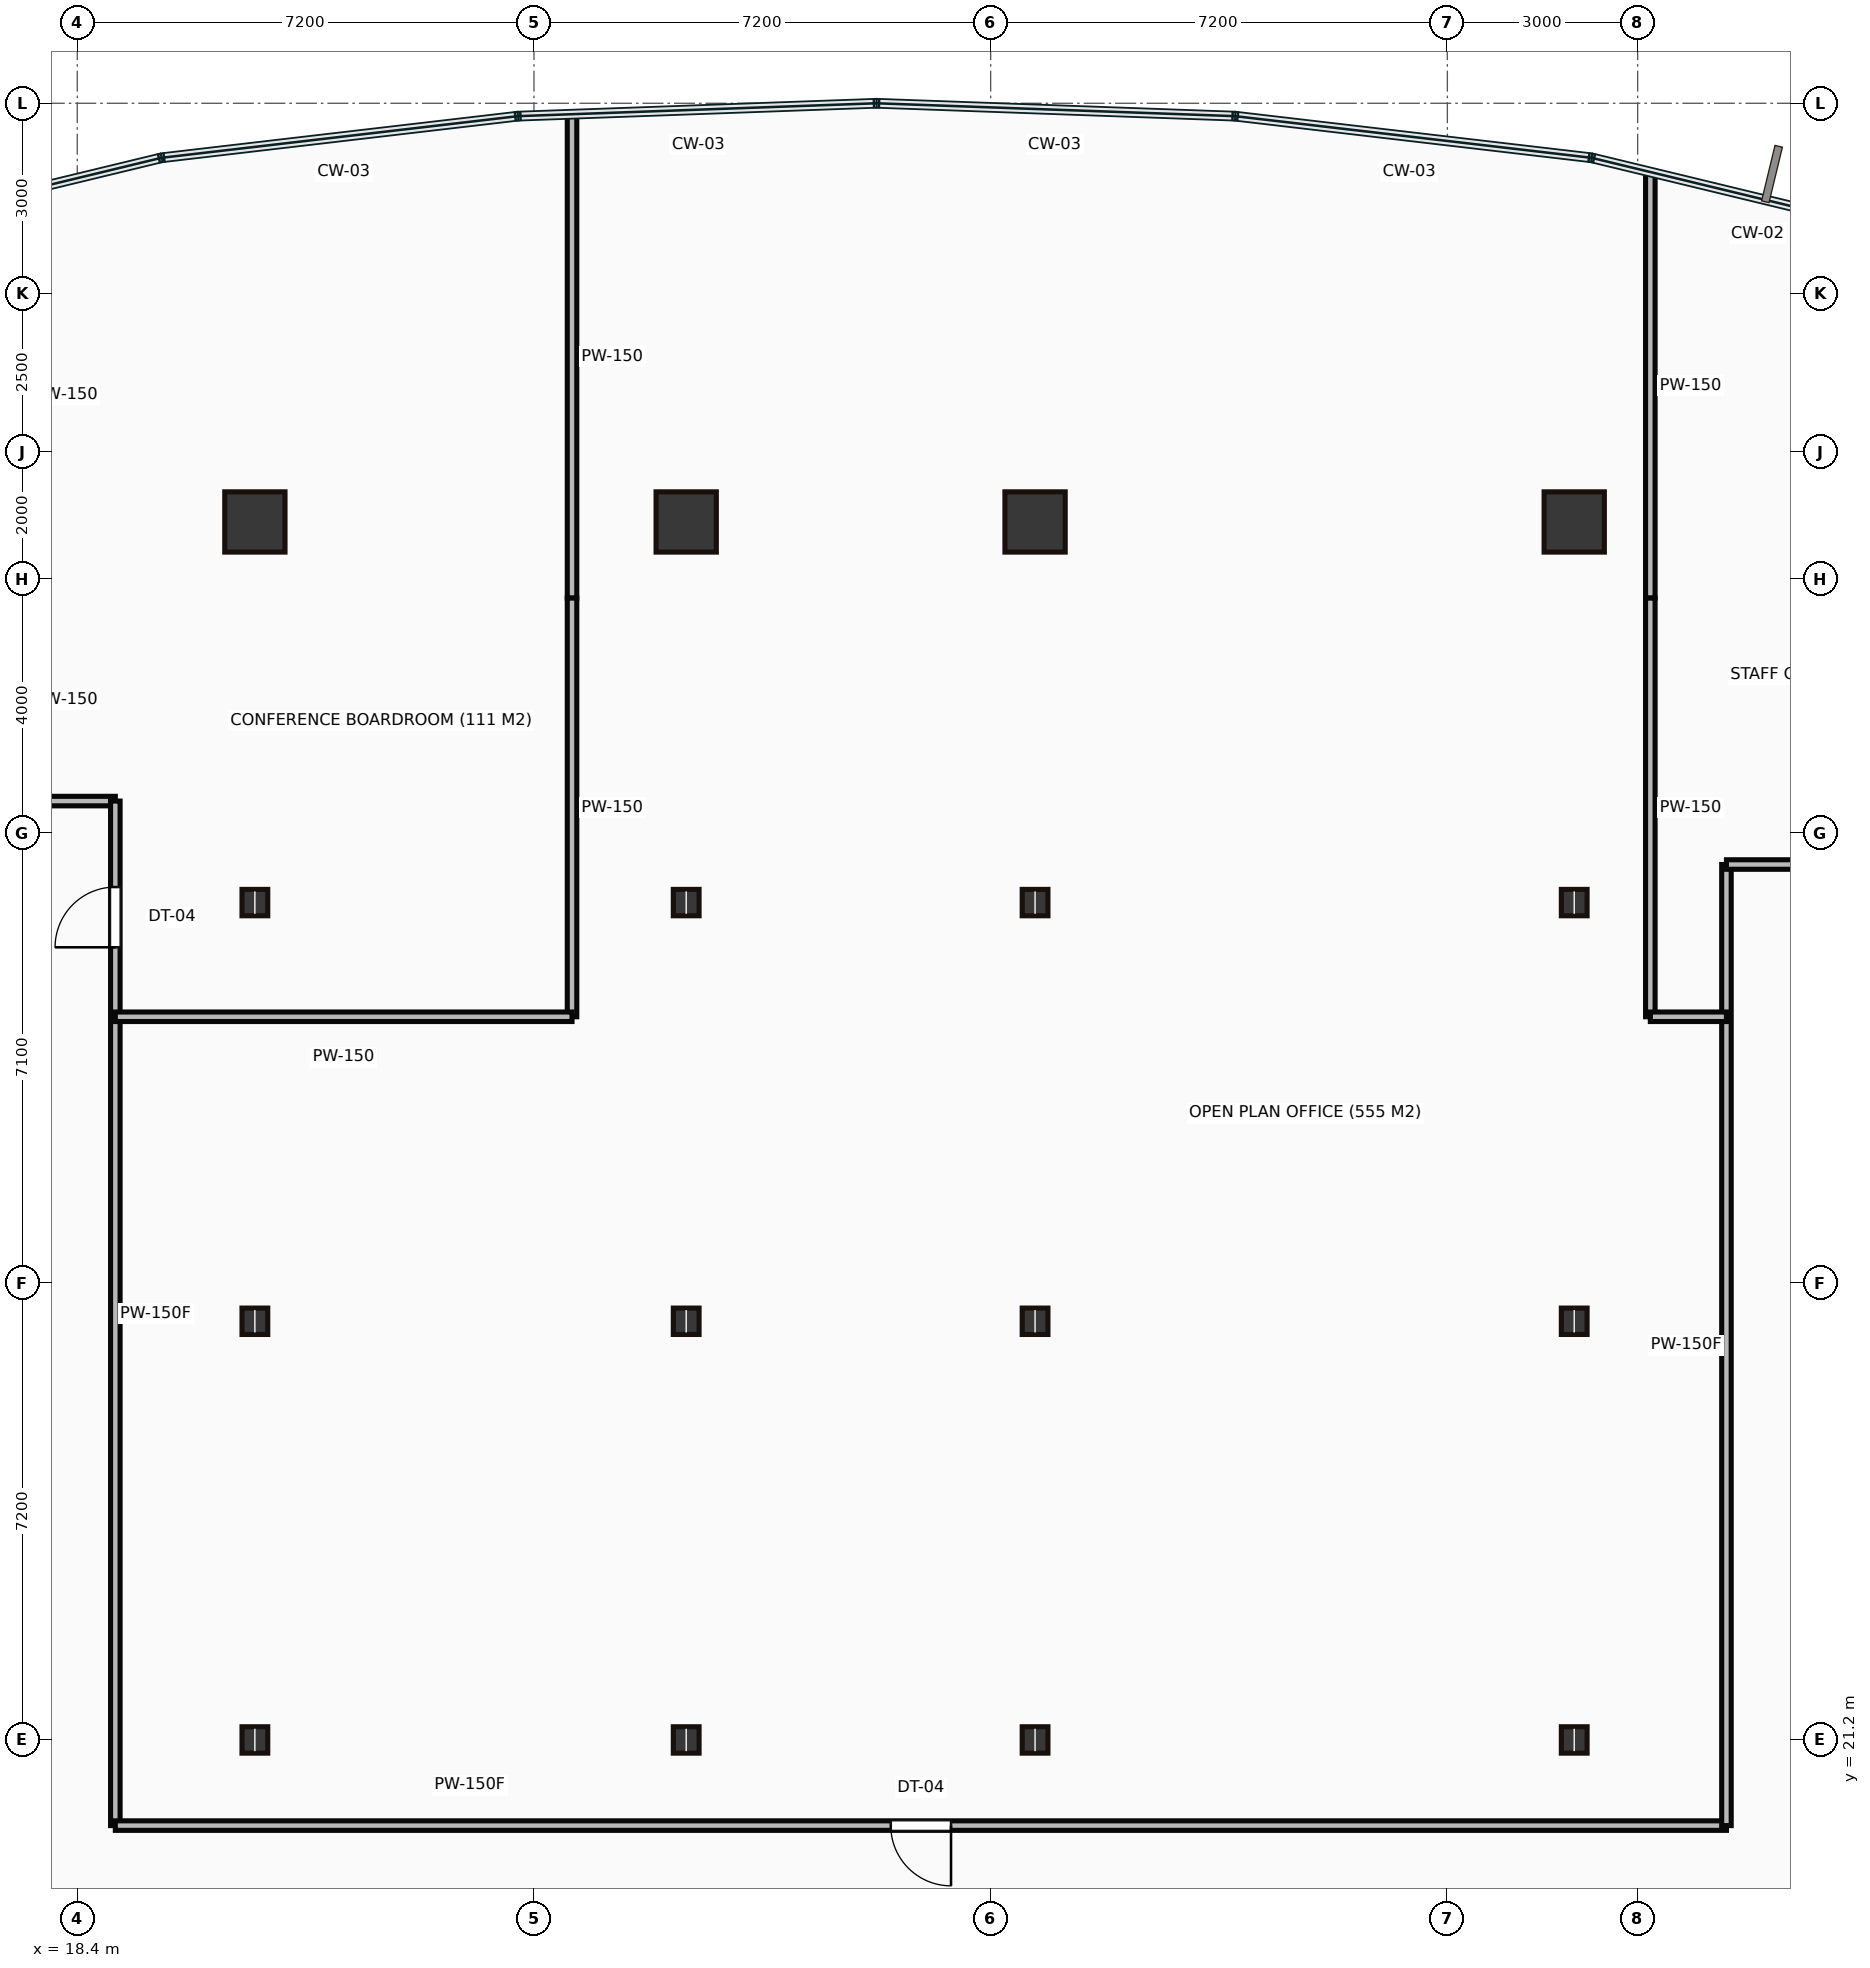
"""IFC4 building model, lengths in metres.
Left out: names, types, materials, properties, quantities, classifications, styles, units other than length and angle.
Written with IfcOpenShell. Run it as: python <this file> out.ifc"""

import sys

from ifc_helpers import new_model, si_unit, direction, frame, frame_2d, origin, origin_2d, place, context, subcontext, project, spatial, rectangle, hollow_rectangle, i_section, extrude, source, transform, mapped, element, fill, save


model = new_model("IFC4")
c1 = context("Model", 3, precision=1e-05, world=origin(), true_north=direction((0.0, 1.0)))
c2 = subcontext(c1, "Body", "Model", "MODEL_VIEW")
j1 = project(units=[si_unit("LENGTHUNIT", "METRE"), si_unit("PLANEANGLEUNIT", "RADIAN")], contexts=[c1])
p1 = place(None, origin())
s1 = spatial("IfcSite", under=j1, at=p1, CompositionType="ELEMENT")
p2 = place(p1, origin())
s2 = spatial("IfcBuilding", under=s1, at=p2, CompositionType="ELEMENT")
p3 = place(p2, frame((0.0, 0.0, 58.05)))
s3 = spatial("IfcBuildingStorey", under=s2, at=p3, CompositionType="ELEMENT", Elevation=58.05)
m1 = source(origin(), c2, "Body", "SweptSolid", [
    extrude(i_section(OverallWidth=0.406, OverallDepth=0.416, WebThickness=0.03, FlangeThickness=0.048, at=origin_2d()), origin(), (0.0, 0.0, 1.0), 3.65),
])
for number, where, z_axis, x_axis in (
    (1, (21.2, 21.2, 0.0), (0.0, 0.0, 1.0), (1.0, 0.0, 0.0)),
    (2, (21.2, 27.8, 0.0), (0.0, 0.0, 1.0), (1.0, 0.0, 0.0)),
    (3, (21.2, 34.4, 0.0), (0.0, 0.0, 1.0), (1.0, 0.0, 0.0)),
):
    element("IfcColumn", number, at=place(p3, frame(where, z_axis=z_axis, x_axis=x_axis)), inside=s3, PredefinedType="COLUMN", context=c2, shape_type="MappedRepresentation", body=[
        mapped(m1, transform((0.0, 0.0, 0.0))),
    ])
m2 = source(origin(), c2, "Body", "SweptSolid", [
    extrude(hollow_rectangle(XDim=0.95, YDim=0.95, WallThickness=0.045, at=origin_2d()), origin(), (0.0, 0.0, 1.0), 3.65),
])
p4 = place(p3, frame((21.2, 40.4, 0.0), z_axis=(0.0, 0.0, 1.0), x_axis=(1.0, 0.0, 0.0)))
e4 = element("IfcColumn", 4, at=p4, inside=s3, PredefinedType="COLUMN", context=c2, shape_type="MappedRepresentation", body=[
    mapped(m2, transform((0.0, 0.0, 0.0))),
])
for number, where, z_axis, x_axis in (
    (5, (28.0, 21.2, 0.0), (0.0, 0.0, 1.0), (1.0, 0.0, 0.0)),
    (6, (28.0, 27.8, 0.0), (0.0, 0.0, 1.0), (1.0, 0.0, 0.0)),
    (7, (28.0, 34.4, 0.0), (0.0, 0.0, 1.0), (1.0, 0.0, 0.0)),
):
    element("IfcColumn", number, at=place(p3, frame(where, z_axis=z_axis, x_axis=x_axis)), inside=s3, PredefinedType="COLUMN", context=c2, shape_type="MappedRepresentation", body=[
        mapped(m1, transform((0.0, 0.0, 0.0))),
    ])
p5 = place(p3, frame((28.0, 40.4, 0.0), z_axis=(0.0, 0.0, 1.0), x_axis=(1.0, 0.0, 0.0)))
e8 = element("IfcColumn", 8, at=p5, inside=s3, PredefinedType="COLUMN", context=c2, shape_type="MappedRepresentation", body=[
    mapped(m2, transform((0.0, 0.0, 0.0))),
])
for number, where, z_axis, x_axis in (
    (9, (33.5, 21.2, 0.0), (0.0, 0.0, 1.0), (1.0, 0.0, 0.0)),
    (10, (33.5, 27.8, 0.0), (0.0, 0.0, 1.0), (1.0, 0.0, 0.0)),
    (11, (33.5, 34.4, 0.0), (0.0, 0.0, 1.0), (1.0, 0.0, 0.0)),
):
    element("IfcColumn", number, at=place(p3, frame(where, z_axis=z_axis, x_axis=x_axis)), inside=s3, PredefinedType="COLUMN", context=c2, shape_type="MappedRepresentation", body=[
        mapped(m1, transform((0.0, 0.0, 0.0))),
    ])
p6 = place(p3, frame((33.5, 40.4, 0.0), z_axis=(0.0, 0.0, 1.0), x_axis=(1.0, 0.0, 0.0)))
e12 = element("IfcColumn", 12, at=p6, inside=s3, PredefinedType="COLUMN", context=c2, shape_type="MappedRepresentation", body=[
    mapped(m2, transform((0.0, 0.0, 0.0))),
])
for number, where, z_axis, x_axis in (
    (13, (42.0, 21.2, 0.0), (0.0, 0.0, 1.0), (1.0, 0.0, 0.0)),
    (14, (42.0, 27.8, 0.0), (0.0, 0.0, 1.0), (1.0, 0.0, 0.0)),
    (15, (42.0, 34.4, 0.0), (0.0, 0.0, 1.0), (1.0, 0.0, 0.0)),
):
    element("IfcColumn", number, at=place(p3, frame(where, z_axis=z_axis, x_axis=x_axis)), inside=s3, PredefinedType="COLUMN", context=c2, shape_type="MappedRepresentation", body=[
        mapped(m1, transform((0.0, 0.0, 0.0))),
    ])
p7 = place(p3, frame((42.0, 40.4, 0.0), z_axis=(0.0, 0.0, 1.0), x_axis=(1.0, 0.0, 0.0)))
e16 = element("IfcColumn", 16, at=p7, inside=s3, PredefinedType="COLUMN", context=c2, shape_type="MappedRepresentation", body=[
    mapped(m2, transform((0.0, 0.0, 0.0))),
])
m3 = source(origin(), c2, "Body", "SweptSolid", [
    extrude(rectangle(XDim=2.2, YDim=0.15, at=frame_2d((1.1, 0.0))), origin(), (0.0, 0.0, 1.0), 3.4),
])
p8 = place(p3, frame((16.8, 36.0, 0.0), z_axis=(0.0, 0.0, 1.0), x_axis=(1.0, 0.0, 0.0)))
e17 = element("IfcWall", 17, at=p8, inside=s3, PredefinedType="PARTITIONING", context=c2, shape_type="MappedRepresentation", body=[
    mapped(m3, transform((0.0, 0.0, 0.0))),
])
m4 = source(origin(), c2, "Body", "SweptSolid", [
    extrude(rectangle(XDim=16.15, YDim=0.15, at=frame_2d((8.075, 0.0))), origin(), (0.0, 0.0, 1.0), 3.4),
])
p9 = place(p3, frame((19.0, 36.0, 0.0), z_axis=(0.0, 0.0, 1.0), x_axis=(0.0, -1.0, 0.0)))
e18 = element("IfcWall", 18, at=p9, inside=s3, PredefinedType="PARTITIONING", context=c2, shape_type="MappedRepresentation", body=[
    mapped(m4, transform((0.0, 0.0, 0.0))),
])
p10 = place(p9, frame((1.355, 0.0, 0.0)))
e19 = element("IfcOpeningElement", 19, at=p10, cuts=e18, PredefinedType="OPENING", context=c2, shape_type="SweptSolid", body=[
    extrude(rectangle(XDim=0.95, YDim=2.15, at=frame_2d((0.475, 1.075))), frame((0.0, 0.085, 0.0), z_axis=(0.0, -1.0, 0.0), x_axis=(1.0, 0.0, 0.0)), (0.0, 0.0, 1.0), 0.17),
])
m5 = source(origin(), c2, "Body", "SweptSolid", [
    extrude(rectangle(XDim=25.4, YDim=0.15, at=frame_2d((12.7, 0.0))), origin(), (0.0, 0.0, 1.0), 3.4),
])
p11 = place(p3, frame((19.0, 19.85, 0.0), z_axis=(0.0, 0.0, 1.0), x_axis=(1.0, 0.0, 0.0)))
e20 = element("IfcWall", 20, at=p11, inside=s3, PredefinedType="PARTITIONING", context=c2, shape_type="MappedRepresentation", body=[
    mapped(m5, transform((0.0, 0.0, 0.0))),
])
p12 = place(p11, frame((12.225, 0.0, 0.0)))
e21 = element("IfcOpeningElement", 21, at=p12, cuts=e20, PredefinedType="OPENING", context=c2, shape_type="SweptSolid", body=[
    extrude(rectangle(XDim=0.95, YDim=2.15, at=frame_2d((0.475, 1.075))), frame((0.0, 0.085, 0.0), z_axis=(0.0, -1.0, 0.0), x_axis=(1.0, 0.0, 0.0)), (0.0, 0.0, 1.0), 0.17),
])
m6 = source(origin(), c2, "Body", "SweptSolid", [
    extrude(rectangle(XDim=15.15, YDim=0.15, at=frame_2d((7.575, 0.0))), origin(), (0.0, 0.0, 1.0), 3.4),
])
p13 = place(p3, frame((44.4, 19.85, 0.0), z_axis=(0.0, 0.0, 1.0), x_axis=(0.0, 1.0, 0.0)))
e22 = element("IfcWall", 22, at=p13, inside=s3, PredefinedType="PARTITIONING", context=c2, shape_type="MappedRepresentation", body=[
    mapped(m6, transform((0.0, 0.0, 0.0))),
])
m7 = source(origin(), c2, "Body", "SweptSolid", [
    extrude(rectangle(XDim=2.2, YDim=0.15, at=frame_2d((1.1, 0.0))), origin(), (0.0, 0.0, 1.0), 3.4),
])
p14 = place(p3, frame((44.4, 35.0, 0.0), z_axis=(0.0, 0.0, 1.0), x_axis=(1.0, 0.0, 0.0)))
e23 = element("IfcWall", 23, at=p14, inside=s3, PredefinedType="PARTITIONING", context=c2, shape_type="MappedRepresentation", body=[
    mapped(m7, transform((0.0, 0.0, 0.0))),
])
m8 = source(origin(), c2, "Body", "SweptSolid", [
    extrude(rectangle(XDim=7.608, YDim=0.15, at=frame_2d((3.804, 0.0))), origin(), (0.0, 0.0, 1.0), 3.4),
])
p15 = place(p3, frame((26.2, 46.808, 0.0), z_axis=(0.0, 0.0, 1.0), x_axis=(0.0, -1.0, 0.0)))
e24 = element("IfcWall", 24, at=p15, inside=s3, PredefinedType="PARTITIONING", context=c2, shape_type="MappedRepresentation", body=[
    mapped(m8, transform((0.0, 0.0, 0.0))),
])
m9 = source(origin(), c2, "Body", "SweptSolid", [
    extrude(rectangle(XDim=6.6, YDim=0.15, at=frame_2d((3.3, 0.0))), origin(), (0.0, 0.0, 1.0), 3.4),
])
p16 = place(p3, frame((26.2, 39.2, 0.0), z_axis=(0.0, 0.0, 1.0), x_axis=(0.0, -1.0, 0.0)))
e25 = element("IfcWall", 25, at=p16, inside=s3, PredefinedType="PARTITIONING", context=c2, shape_type="MappedRepresentation", body=[
    mapped(m9, transform((0.0, 0.0, 0.0))),
])
m10 = source(origin(), c2, "Body", "SweptSolid", [
    extrude(rectangle(XDim=7.2, YDim=0.15, at=frame_2d((3.6, 0.0))), origin(), (0.0, 0.0, 1.0), 3.4),
])
p17 = place(p3, frame((26.2, 32.6, 0.0), z_axis=(0.0, 0.0, 1.0), x_axis=(-1.0, 0.0, 0.0)))
e26 = element("IfcWall", 26, at=p17, inside=s3, PredefinedType="PARTITIONING", context=c2, shape_type="MappedRepresentation", body=[
    mapped(m10, transform((0.0, 0.0, 0.0))),
])
m11 = source(origin(), c2, "Body", "SweptSolid", [
    extrude(rectangle(XDim=6.696, YDim=0.15, at=frame_2d((3.348, 0.0))), origin(), (0.0, 0.0, 1.0), 3.4),
])
p18 = place(p3, frame((43.2, 45.896, 0.0), z_axis=(0.0, 0.0, 1.0), x_axis=(0.0, -1.0, 0.0)))
e27 = element("IfcWall", 27, at=p18, inside=s3, PredefinedType="PARTITIONING", context=c2, shape_type="MappedRepresentation", body=[
    mapped(m11, transform((0.0, 0.0, 0.0))),
])
p19 = place(p3, frame((43.2, 39.2, 0.0), z_axis=(0.0, 0.0, 1.0), x_axis=(0.0, -1.0, 0.0)))
e28 = element("IfcWall", 28, at=p19, inside=s3, PredefinedType="PARTITIONING", context=c2, shape_type="MappedRepresentation", body=[
    mapped(m9, transform((0.0, 0.0, 0.0))),
])
m12 = source(origin(), c2, "Body", "SweptSolid", [
    extrude(rectangle(XDim=1.2, YDim=0.15, at=frame_2d((0.6, 0.0))), origin(), (0.0, 0.0, 1.0), 3.4),
])
p20 = place(p3, frame((43.2, 32.6, 0.0), z_axis=(0.0, 0.0, 1.0), x_axis=(1.0, 0.0, 0.0)))
e29 = element("IfcWall", 29, at=p20, inside=s3, PredefinedType="PARTITIONING", context=c2, shape_type="MappedRepresentation", body=[
    mapped(m12, transform((0.0, 0.0, 0.0))),
])
m13 = source(origin(), c2, "Body", "SweptSolid", [
    extrude(rectangle(XDim=0.95, YDim=2.15, at=frame_2d((0.475, 1.075))), frame((0.0, 0.025, 0.0), z_axis=(0.0, -1.0, 0.0), x_axis=(1.0, 0.0, 0.0)), (0.0, 0.0, 1.0), 0.05),
])
p21 = place(p10, origin())
e30 = element("IfcDoor", 30, at=p21, inside=s3, OperationType="SINGLE_SWING_RIGHT", PredefinedType="DOOR", context=c2, shape_type="MappedRepresentation", body=[
    mapped(m13, transform((0.0, 0.0, 0.0))),
])
fill(e19, e30)
p22 = place(p12, origin())
e31 = element("IfcDoor", 31, at=p22, inside=s3, OperationType="SINGLE_SWING_RIGHT", PredefinedType="DOOR", context=c2, shape_type="MappedRepresentation", body=[
    mapped(m13, transform((0.0, 0.0, 0.0))),
])
fill(e21, e31)
save(model, sys.argv[1])
